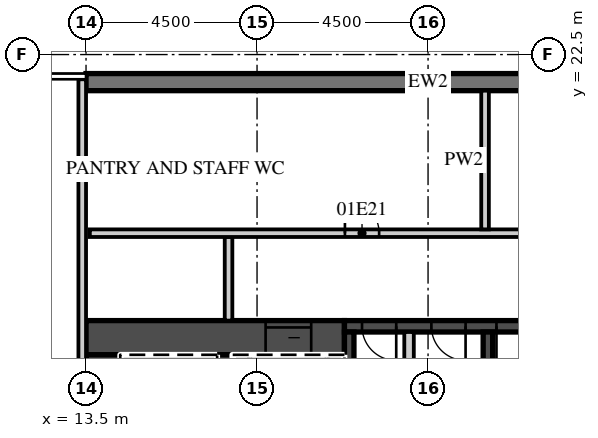
"""IFC4 building model, lengths in metres.
Left out: names, types, materials, properties, quantities, classifications, styles, units other than length and angle.
Written with IfcOpenShell. Run it as: python <this file> out.ifc"""

import sys

from ifc_helpers import new_model, si_unit, direction, frame, frame_2d, origin, place, context, subcontext, project, spatial, rectangle, extrude, element, fill, save


model = new_model("IFC4")
c1 = context("Model", 3, precision=1e-05, world=origin(), true_north=direction((0.0, 1.0)))
c2 = subcontext(c1, "Body", "Model", "MODEL_VIEW")
j1 = project(units=[si_unit("LENGTHUNIT", "METRE"), si_unit("PLANEANGLEUNIT", "RADIAN")], contexts=[c1])
p1 = place(None, origin())
s1 = spatial("IfcSite", under=j1, at=p1, CompositionType="ELEMENT")
p2 = place(p1, origin())
s2 = spatial("IfcBuilding", under=s1, at=p2, CompositionType="ELEMENT")
p3 = place(p2, frame((0.0, 0.0, 11.0)))
s3 = spatial("IfcBuildingStorey", under=s2, at=p3, CompositionType="ELEMENT", Elevation=11.0)
p4 = place(p3, frame((31.5, 21.775, 0.0), z_axis=(0.0, 0.0, 1.0), x_axis=(-1.0, 0.0, 0.0)))
e1 = element("IfcWall", 1, at=p4, inside=s3, PredefinedType="SOLIDWALL", context=c2, shape_type="SweptSolid", body=[
    extrude(rectangle(XDim=18.0, YDim=0.45, at=frame_2d((9.0, 0.0))), origin(), (0.0, 0.0, 1.0), 5.55),
])
p5 = place(p3, frame((13.5, 15.05, 0.0), z_axis=(0.0, 0.0, 1.0), x_axis=(1.0, 0.0, 0.0)))
e2 = element("IfcWall", 2, at=p5, inside=s3, PredefinedType="SHEAR", context=c2, shape_type="SweptSolid", body=[
    extrude(rectangle(XDim=6.8, YDim=0.9, at=frame_2d((3.4, 0.0))), origin(), (0.0, 0.0, 1.0), 5.55),
])
p6 = place(p5, frame((4.725, 0.0, 0.0)))
e3 = element("IfcOpeningElement", 3, at=p6, cuts=e2, PredefinedType="OPENING", context=c2, shape_type="SweptSolid", body=[
    extrude(rectangle(XDim=1.2, YDim=2.1, at=frame_2d((0.6, 1.05))), frame((0.0, 0.46, 0.0), z_axis=(0.0, -1.0, 0.0), x_axis=(1.0, 0.0, 0.0)), (0.0, 0.0, 1.0), 0.92),
])
p7 = place(p3, frame((20.3, 15.35, 0.0), z_axis=(0.0, 0.0, 1.0), x_axis=(1.0, 0.0, 0.0)))
e4 = element("IfcWall", 4, at=p7, inside=s3, PredefinedType="SHEAR", context=c2, shape_type="SweptSolid", body=[
    extrude(rectangle(XDim=10.3, YDim=0.3, at=frame_2d((5.15, 0.0))), origin(), (0.0, 0.0, 1.0), 5.55),
])
p8 = place(p7, frame((4.0, 0.0, 0.0)))
e5 = element("IfcOpeningElement", 5, at=p8, cuts=e4, PredefinedType="OPENING", context=c2, shape_type="SweptSolid", body=[
    extrude(rectangle(XDim=1.3, YDim=2.1, at=frame_2d((0.65, 1.05))), frame((0.0, 0.16, 0.0), z_axis=(0.0, -1.0, 0.0), x_axis=(1.0, 0.0, 0.0)), (0.0, 0.0, 1.0), 0.32),
])
p9 = place(p7, frame((2.288, 0.0, 0.0)))
e6 = element("IfcOpeningElement", 6, at=p9, cuts=e4, PredefinedType="OPENING", context=c2, shape_type="SweptSolid", body=[
    extrude(rectangle(XDim=0.9, YDim=2.1, at=frame_2d((0.45, 1.05))), frame((0.0, 0.16, 0.0), z_axis=(0.0, -1.0, 0.0), x_axis=(1.0, 0.0, 0.0)), (0.0, 0.0, 1.0), 0.32),
])
p10 = place(p7, frame((0.462, 0.0, 0.0)))
e7 = element("IfcOpeningElement", 7, at=p10, cuts=e4, PredefinedType="OPENING", context=c2, shape_type="SweptSolid", body=[
    extrude(rectangle(XDim=0.9, YDim=2.1, at=frame_2d((0.45, 1.05))), frame((0.0, 0.16, 0.0), z_axis=(0.0, -1.0, 0.0), x_axis=(1.0, 0.0, 0.0)), (0.0, 0.0, 1.0), 0.32),
])
p11 = place(p3, frame((13.95, 2.4, 0.0), z_axis=(0.0, 0.0, 1.0), x_axis=(0.0, 1.0, 0.0)))
e8 = element("IfcWall", 8, at=p11, inside=s3, PredefinedType="SHEAR", context=c2, shape_type="SweptSolid", body=[
    extrude(rectangle(XDim=12.2, YDim=0.9, at=frame_2d((6.1, 0.0))), origin(), (0.0, 0.0, 1.0), 5.55),
])
p12 = place(p3, frame((17.15, 8.8, 0.0), z_axis=(0.0, 0.0, 1.0), x_axis=(0.0, 1.0, 0.0)))
e9 = element("IfcWall", 9, at=p12, inside=s3, PredefinedType="SHEAR", context=c2, shape_type="SweptSolid", body=[
    extrude(rectangle(XDim=5.8, YDim=0.4, at=frame_2d((2.9, 0.0))), origin(), (0.0, 0.0, 1.0), 5.55),
])
for number, where, z_axis, x_axis in (
    (10, (20.425, 11.95, 0.0), (0.0, 0.0, 1.0), (0.0, 1.0, 0.0)),
    (11, (24.075, 11.95, 0.0), (0.0, 0.0, 1.0), (0.0, 1.0, 0.0)),
):
    element("IfcWall", number, at=place(p3, frame(where, z_axis=z_axis, x_axis=x_axis)), inside=s3, PredefinedType="SHEAR", context=c2, shape_type="SweptSolid", body=[
        extrude(rectangle(XDim=3.25, YDim=0.25, at=frame_2d((1.625, 0.0))), origin(), (0.0, 0.0, 1.0), 5.55),
    ])
p13 = place(p3, frame((22.0, 11.95, 0.0), z_axis=(0.0, 0.0, 1.0), x_axis=(0.0, 1.0, 0.0)))
e12 = element("IfcWall", 12, at=p13, inside=s3, PredefinedType="PARTITIONING", context=c2, shape_type="SweptSolid", body=[
    extrude(rectangle(XDim=3.25, YDim=0.25, at=frame_2d((1.625, 0.0))), origin(), (0.0, 0.0, 1.0), 5.55),
])
p14 = place(p3, frame((17.25, 15.5, 0.0), z_axis=(0.0, 0.0, 1.0), x_axis=(0.0, 1.0, 0.0)))
e13 = element("IfcWall", 13, at=p14, inside=s3, PredefinedType="PARTITIONING", context=c2, shape_type="SweptSolid", body=[
    extrude(rectangle(XDim=2.2, YDim=0.2, at=frame_2d((1.1, 0.0))), origin(), (0.0, 0.0, 1.0), 5.55),
])
p15 = place(p3, frame((13.6, 17.8, 0.0), z_axis=(0.0, 0.0, 1.0), x_axis=(1.0, 0.0, 0.0)))
e14 = element("IfcWall", 14, at=p15, inside=s3, PredefinedType="PARTITIONING", context=c2, shape_type="SweptSolid", body=[
    extrude(rectangle(XDim=30.95, YDim=0.2, at=frame_2d((15.475, 0.0))), origin(), (0.0, 0.0, 1.0), 5.55),
])
p16 = place(p15, frame((15.012, 0.0, 0.0)))
e15 = element("IfcOpeningElement", 15, at=p16, cuts=e14, PredefinedType="OPENING", context=c2, shape_type="SweptSolid", body=[
    extrude(rectangle(XDim=0.9, YDim=2.1, at=frame_2d((0.45, 1.05))), frame((0.0, 0.11, 0.0), z_axis=(0.0, -1.0, 0.0), x_axis=(1.0, 0.0, 0.0)), (0.0, 0.0, 1.0), 0.22),
])
p17 = place(p15, frame((6.712, 0.0, 0.0)))
e16 = element("IfcOpeningElement", 16, at=p17, cuts=e14, PredefinedType="OPENING", context=c2, shape_type="SweptSolid", body=[
    extrude(rectangle(XDim=0.9, YDim=2.1, at=frame_2d((0.45, 1.05))), frame((0.0, 0.11, 0.0), z_axis=(0.0, -1.0, 0.0), x_axis=(1.0, 0.0, 0.0)), (0.0, 0.0, 1.0), 0.22),
])
p18 = place(p3, frame((24.0, 17.9, 0.0), z_axis=(0.0, 0.0, 1.0), x_axis=(0.0, 1.0, 0.0)))
e17 = element("IfcWall", 17, at=p18, inside=s3, PredefinedType="PARTITIONING", context=c2, shape_type="SweptSolid", body=[
    extrude(rectangle(XDim=3.65, YDim=0.2, at=frame_2d((1.825, 0.0))), origin(), (0.0, 0.0, 1.0), 5.55),
])
p19 = place(p3, frame((13.4, 1.7, 0.0), z_axis=(0.0, 0.0, 1.0), x_axis=(0.0, 1.0, 0.0)))
e18 = element("IfcWall", 18, at=p19, inside=s3, PredefinedType="PARTITIONING", context=c2, shape_type="SweptSolid", body=[
    extrude(rectangle(XDim=20.15, YDim=0.2, at=frame_2d((10.075, 0.0))), origin(), (0.0, 0.0, 1.0), 5.55),
])
p20 = place(p6, origin())
e19 = element("IfcDoor", 19, at=p20, inside=s3, OperationType="SLIDING_TO_LEFT", PredefinedType="DOOR", context=c2, shape_type="SweptSolid", body=[
    extrude(rectangle(XDim=1.2, YDim=2.1, at=frame_2d((0.6, 1.05))), frame((0.0, 0.025, 0.0), z_axis=(0.0, -1.0, 0.0), x_axis=(1.0, 0.0, 0.0)), (0.0, 0.0, 1.0), 0.05),
])
fill(e3, e19)
p21 = place(p8, origin())
e20 = element("IfcDoor", 20, at=p21, inside=s3, OperationType="SINGLE_SWING_LEFT", PredefinedType="DOOR", context=c2, shape_type="SweptSolid", body=[
    extrude(rectangle(XDim=1.3, YDim=2.1, at=frame_2d((0.65, 1.05))), frame((0.0, 0.025, 0.0), z_axis=(0.0, -1.0, 0.0), x_axis=(1.0, 0.0, 0.0)), (0.0, 0.0, 1.0), 0.05),
])
fill(e5, e20)
p22 = place(p9, origin())
e21 = element("IfcDoor", 21, at=p22, inside=s3, OperationType="SINGLE_SWING_RIGHT", PredefinedType="DOOR", context=c2, shape_type="SweptSolid", body=[
    extrude(rectangle(XDim=0.9, YDim=2.1, at=frame_2d((0.45, 1.05))), frame((0.0, 0.025, 0.0), z_axis=(0.0, -1.0, 0.0), x_axis=(1.0, 0.0, 0.0)), (0.0, 0.0, 1.0), 0.05),
])
fill(e6, e21)
p23 = place(p10, origin())
e22 = element("IfcDoor", 22, at=p23, inside=s3, OperationType="SINGLE_SWING_RIGHT", PredefinedType="DOOR", context=c2, shape_type="SweptSolid", body=[
    extrude(rectangle(XDim=0.9, YDim=2.1, at=frame_2d((0.45, 1.05))), frame((0.0, 0.025, 0.0), z_axis=(0.0, -1.0, 0.0), x_axis=(1.0, 0.0, 0.0)), (0.0, 0.0, 1.0), 0.05),
])
fill(e7, e22)
p24 = place(p17, origin())
e23 = element("IfcDoor", 23, at=p24, inside=s3, OperationType="SINGLE_SWING_LEFT", PredefinedType="DOOR", context=c2, shape_type="SweptSolid", body=[
    extrude(rectangle(XDim=0.9, YDim=2.1, at=frame_2d((0.45, 1.05))), frame((0.0, 0.025, 0.0), z_axis=(0.0, -1.0, 0.0), x_axis=(1.0, 0.0, 0.0)), (0.0, 0.0, 1.0), 0.05),
])
fill(e16, e23)
save(model, sys.argv[1])
